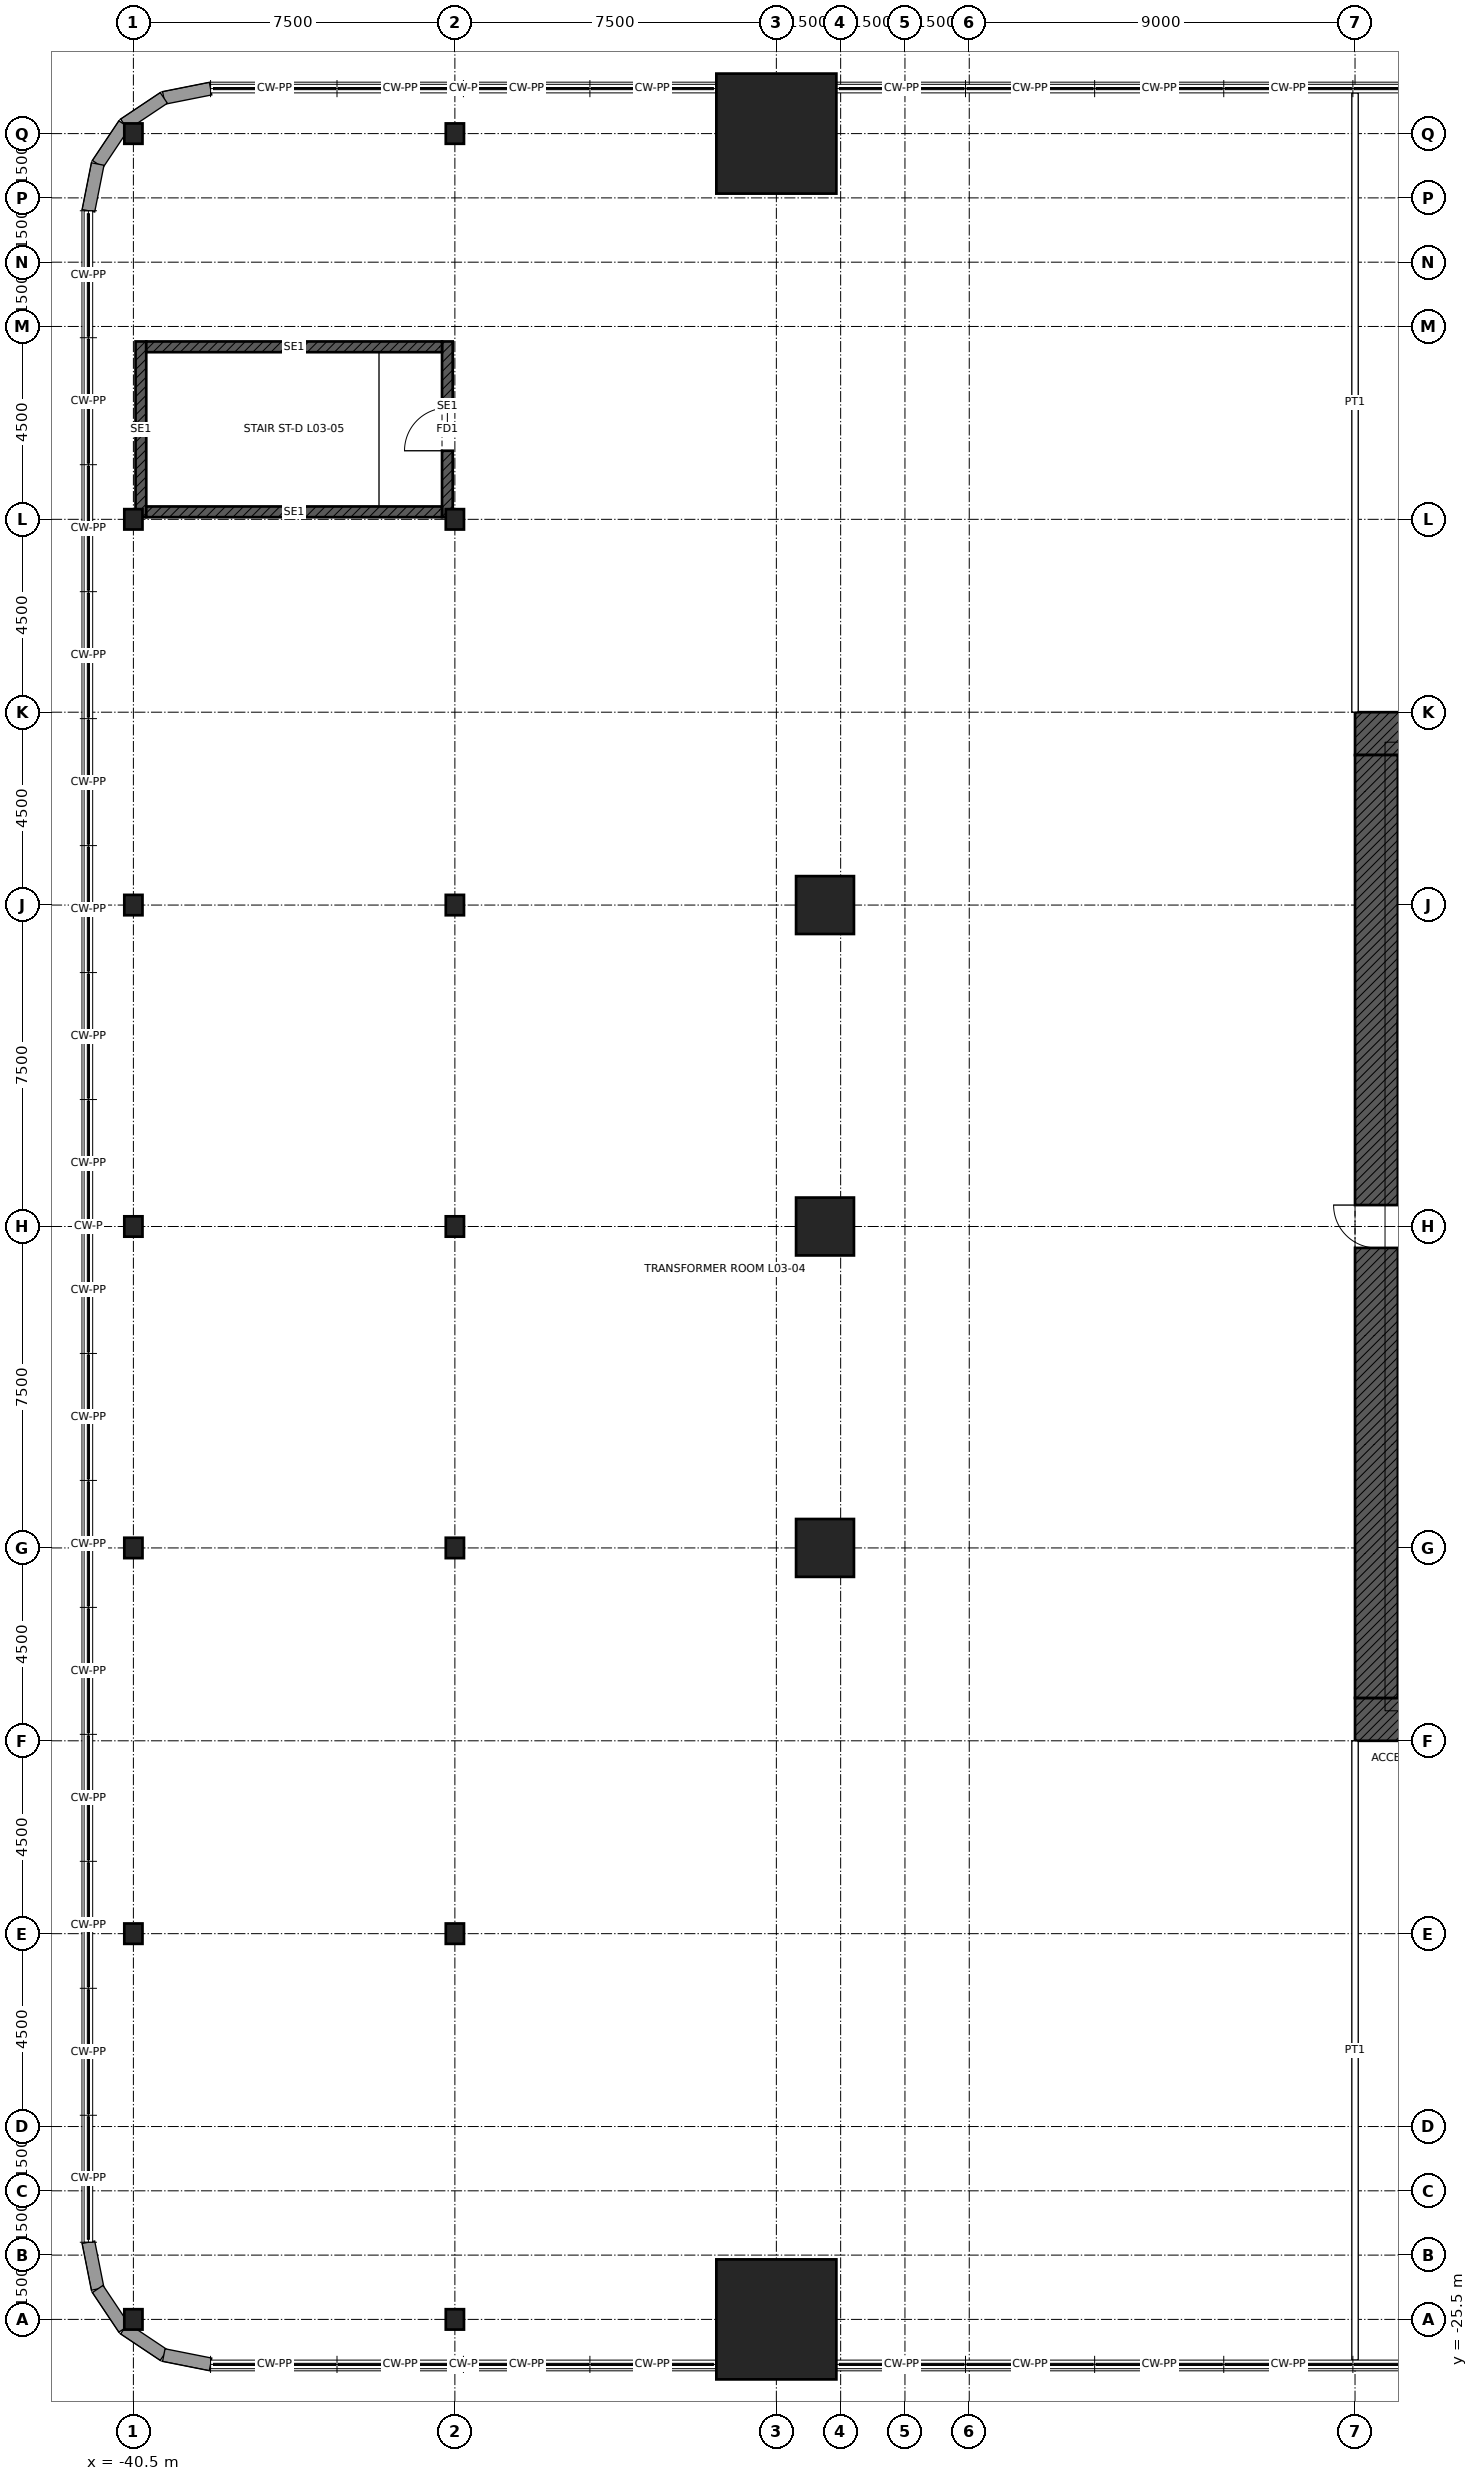
"""IFC4 building model, lengths in metres.
Left out: names, types, materials, properties, quantities, classifications, styles, units other than length and angle.
Written with IfcOpenShell. Run it as: python <this file> out.ifc"""

import sys

from ifc_helpers import new_model, si_unit, direction, frame, frame_2d, origin, origin_2d, place, context, subcontext, project, spatial, rectangle, hollow_rectangle, i_section, extrude, element, fill, save


model = new_model("IFC4")
c1 = context("Model", 3, precision=1e-05, world=origin(), true_north=direction((0.0, 1.0)))
c2 = subcontext(c1, "Body", "Model", "MODEL_VIEW")
j1 = project(units=[si_unit("LENGTHUNIT", "METRE"), si_unit("PLANEANGLEUNIT", "RADIAN")], contexts=[c1])
p1 = place(None, origin())
s1 = spatial("IfcSite", under=j1, at=p1, CompositionType="ELEMENT")
p2 = place(p1, origin())
s2 = spatial("IfcBuilding", under=s1, at=p2, CompositionType="ELEMENT")
p3 = place(p2, frame((0.0, 0.0, 18.0)))
s3 = spatial("IfcBuildingStorey", under=s2, at=p3, CompositionType="ELEMENT", Elevation=18.0)
for number, where, z_axis, x_axis in (
    (1, (-25.5, -25.5, 0.0), (0.0, 0.0, 1.0), (1.0, 0.0, 0.0)),
    (2, (-25.5, 25.5, 0.0), (0.0, 0.0, 1.0), (1.0, 0.0, 0.0)),
):
    element("IfcColumn", number, at=place(p3, frame(where, z_axis=z_axis, x_axis=x_axis)), inside=s3, PredefinedType="COLUMN", context=c2, shape_type="SweptSolid", body=[
        extrude(hollow_rectangle(XDim=2.8, YDim=2.8, WallThickness=0.14, at=origin_2d()), origin(), (0.0, 0.0, 1.0), 5.4),
    ])
for number, where, z_axis, x_axis in (
    (3, (-24.365, -7.5, 0.0), (0.0, 0.0, 1.0), (1.0, 0.0, 0.0)),
    (4, (-24.365, 0.0, 0.0), (0.0, 0.0, 1.0), (1.0, 0.0, 0.0)),
    (5, (-24.365, 7.5, 0.0), (0.0, 0.0, 1.0), (1.0, 0.0, 0.0)),
):
    element("IfcColumn", number, at=place(p3, frame(where, z_axis=z_axis, x_axis=x_axis)), inside=s3, PredefinedType="COLUMN", context=c2, shape_type="SweptSolid", body=[
        extrude(hollow_rectangle(XDim=1.35, YDim=1.35, WallThickness=0.1, at=origin_2d()), origin(), (0.0, 0.0, 1.0), 5.4),
    ])
for number, where, z_axis, x_axis in (
    (6, (-33.0, -25.5, 0.0), (0.0, 0.0, 1.0), (1.0, 0.0, 0.0)),
    (7, (-33.0, -16.5, 0.0), (0.0, 0.0, 1.0), (1.0, 0.0, 0.0)),
    (8, (-33.0, -7.5, 0.0), (0.0, 0.0, 1.0), (1.0, 0.0, 0.0)),
    (9, (-33.0, 0.0, 0.0), (0.0, 0.0, 1.0), (1.0, 0.0, 0.0)),
    (10, (-33.0, 7.5, 0.0), (0.0, 0.0, 1.0), (1.0, 0.0, 0.0)),
    (11, (-33.0, 16.5, 0.0), (0.0, 0.0, 1.0), (1.0, 0.0, 0.0)),
    (12, (-33.0, 25.5, 0.0), (0.0, 0.0, 1.0), (1.0, 0.0, 0.0)),
    (13, (-40.5, -25.5, 0.0), (0.0, 0.0, 1.0), (1.0, 0.0, 0.0)),
    (14, (-40.5, -16.5, 0.0), (0.0, 0.0, 1.0), (1.0, 0.0, 0.0)),
    (15, (-40.5, -7.5, 0.0), (0.0, 0.0, 1.0), (1.0, 0.0, 0.0)),
    (16, (-40.5, 0.0, 0.0), (0.0, 0.0, 1.0), (1.0, 0.0, 0.0)),
    (17, (-40.5, 7.5, 0.0), (0.0, 0.0, 1.0), (1.0, 0.0, 0.0)),
    (18, (-40.5, 16.5, 0.0), (0.0, 0.0, 1.0), (1.0, 0.0, 0.0)),
    (19, (-40.5, 25.5, 0.0), (0.0, 0.0, 1.0), (1.0, 0.0, 0.0)),
):
    element("IfcColumn", number, at=place(p3, frame(where, z_axis=z_axis, x_axis=x_axis)), inside=s3, PredefinedType="COLUMN", context=c2, shape_type="SweptSolid", body=[
        extrude(i_section(OverallWidth=0.424, OverallDepth=0.475, WebThickness=0.048, FlangeThickness=0.077, at=origin_2d()), origin(), (0.0, 0.0, 1.0), 5.4),
    ])
p4 = place(p3, frame((-12.0, 11.5, 0.0), z_axis=(0.0, 0.0, 1.0), x_axis=(1.0, 0.0, 0.0)))
e20 = element("IfcWall", 20, at=p4, inside=s3, PredefinedType="SHEAR", context=c2, shape_type="SweptSolid", body=[
    extrude(rectangle(XDim=24.0, YDim=1.0, at=frame_2d((12.0, 0.0))), origin(), (0.0, 0.0, 1.0), 5.4),
])
p5 = place(p4, frame((6.25, 0.0, 0.0)))
e21 = element("IfcOpeningElement", 21, at=p5, cuts=e20, PredefinedType="OPENING", context=c2, shape_type="SweptSolid", body=[
    extrude(rectangle(XDim=1.0, YDim=2.4, at=frame_2d((0.5, 1.2))), frame((0.0, 0.51, 0.0), z_axis=(0.0, -1.0, 0.0), x_axis=(1.0, 0.0, 0.0)), (0.0, 0.0, 1.0), 1.02),
])
p6 = place(p4, frame((16.75, 0.0, 0.0)))
e22 = element("IfcOpeningElement", 22, at=p6, cuts=e20, PredefinedType="OPENING", context=c2, shape_type="SweptSolid", body=[
    extrude(rectangle(XDim=1.0, YDim=2.4, at=frame_2d((0.5, 1.2))), frame((0.0, 0.51, 0.0), z_axis=(0.0, -1.0, 0.0), x_axis=(1.0, 0.0, 0.0)), (0.0, 0.0, 1.0), 1.02),
])
p7 = place(p3, frame((12.0, -11.5, 0.0), z_axis=(0.0, 0.0, 1.0), x_axis=(-1.0, 0.0, 0.0)))
e23 = element("IfcWall", 23, at=p7, inside=s3, PredefinedType="SHEAR", context=c2, shape_type="SweptSolid", body=[
    extrude(rectangle(XDim=24.0, YDim=1.0, at=frame_2d((12.0, 0.0))), origin(), (0.0, 0.0, 1.0), 5.4),
])
p8 = place(p7, frame((11.5, 0.0, 0.0)))
e24 = element("IfcOpeningElement", 24, at=p8, cuts=e23, PredefinedType="OPENING", context=c2, shape_type="SweptSolid", body=[
    extrude(rectangle(XDim=1.0, YDim=2.1, at=frame_2d((0.5, 1.05))), frame((0.0, 0.51, 0.0), z_axis=(0.0, -1.0, 0.0), x_axis=(1.0, 0.0, 0.0)), (0.0, 0.0, 1.0), 1.02),
])
p9 = place(p7, frame((1.0, 0.0, 0.0)))
e25 = element("IfcOpeningElement", 25, at=p9, cuts=e23, PredefinedType="OPENING", context=c2, shape_type="SweptSolid", body=[
    extrude(rectangle(XDim=1.0, YDim=2.4, at=frame_2d((0.5, 1.2))), frame((0.0, 0.51, 0.0), z_axis=(0.0, -1.0, 0.0), x_axis=(1.0, 0.0, 0.0)), (0.0, 0.0, 1.0), 1.02),
])
p10 = place(p3, frame((-11.5, -11.0, 0.0), z_axis=(0.0, 0.0, 1.0), x_axis=(0.0, 1.0, 0.0)))
e26 = element("IfcWall", 26, at=p10, inside=s3, PredefinedType="SHEAR", context=c2, shape_type="SweptSolid", body=[
    extrude(rectangle(XDim=22.0, YDim=1.0, at=frame_2d((11.0, 0.0))), origin(), (0.0, 0.0, 1.0), 5.4),
])
p11 = place(p10, frame((10.5, 0.0, 0.0)))
e27 = element("IfcOpeningElement", 27, at=p11, cuts=e26, PredefinedType="OPENING", context=c2, shape_type="SweptSolid", body=[
    extrude(rectangle(XDim=1.0, YDim=2.4, at=frame_2d((0.5, 1.2))), frame((0.0, 0.51, 0.0), z_axis=(0.0, -1.0, 0.0), x_axis=(1.0, 0.0, 0.0)), (0.0, 0.0, 1.0), 1.02),
])
for number, where, z_axis, x_axis in (
    (28, (-38.7, 26.55, 0.0), (0.0, 0.0, 1.0), (-0.981, -0.195, 0.0)),
    (29, (-39.791, 26.333, 0.0), (0.0, 0.0, 1.0), (-0.832, -0.555, 0.0)),
    (30, (-40.715, 25.715, 0.0), (0.0, 0.0, 1.0), (-0.555, -0.832, 0.0)),
    (31, (-41.333, 24.791, 0.0), (0.0, 0.0, 1.0), (-0.195, -0.981, 0.0)),
    (32, (-41.55, -23.7, 0.0), (0.0, 0.0, 1.0), (0.195, -0.981, 0.0)),
    (33, (-41.333, -24.791, 0.0), (0.0, 0.0, 1.0), (0.555, -0.832, 0.0)),
    (34, (-40.715, -25.715, 0.0), (0.0, 0.0, 1.0), (0.832, -0.555, 0.0)),
    (35, (-39.791, -26.333, 0.0), (0.0, 0.0, 1.0), (0.981, -0.195, 0.0)),
):
    element("IfcWall", number, at=place(p3, frame(where, z_axis=z_axis, x_axis=x_axis)), inside=s3, PredefinedType="SOLIDWALL", context=c2, shape_type="SweptSolid", body=[
        extrude(rectangle(XDim=1.112, YDim=0.3, at=frame_2d((0.556, 0.0))), origin(), (0.0, 0.0, 1.0), 5.2),
    ])
p12 = place(p3, frame((-12.0, 12.0, 0.0), z_axis=(0.0, 0.0, 1.0), x_axis=(0.0, 1.0, 0.0)))
e36 = element("IfcWall", 36, at=p12, inside=s3, PredefinedType="PARTITIONING", context=c2, shape_type="SweptSolid", body=[
    extrude(rectangle(XDim=14.45, YDim=0.15, at=frame_2d((7.225, 0.0))), origin(), (0.0, 0.0, 1.0), 4.164),
])
p13 = place(p3, frame((-12.0, -12.0, 0.0), z_axis=(0.0, 0.0, 1.0), x_axis=(0.0, -1.0, 0.0)))
e37 = element("IfcWall", 37, at=p13, inside=s3, PredefinedType="PARTITIONING", context=c2, shape_type="SweptSolid", body=[
    extrude(rectangle(XDim=14.45, YDim=0.15, at=frame_2d((7.225, 0.0))), origin(), (0.0, 0.0, 1.0), 5.2),
])
p14 = place(p3, frame((-40.325, 16.55, 0.0), z_axis=(0.0, 0.0, 1.0), x_axis=(0.0, 1.0, 0.0)))
e38 = element("IfcWall", 38, at=p14, inside=s3, PredefinedType="SOLIDWALL", context=c2, shape_type="SweptSolid", body=[
    extrude(rectangle(XDim=4.1, YDim=0.25, at=frame_2d((2.05, 0.0))), origin(), (0.0, 0.0, 1.0), 5.2),
])
p15 = place(p3, frame((-33.175, 16.55, 0.0), z_axis=(0.0, 0.0, 1.0), x_axis=(0.0, 1.0, 0.0)))
e39 = element("IfcWall", 39, at=p15, inside=s3, PredefinedType="SOLIDWALL", context=c2, shape_type="SweptSolid", body=[
    extrude(rectangle(XDim=4.1, YDim=0.25, at=frame_2d((2.05, 0.0))), origin(), (0.0, 0.0, 1.0), 5.2),
])
p16 = place(p15, frame((1.55, 0.0, 0.0)))
e40 = element("IfcOpeningElement", 40, at=p16, cuts=e39, PredefinedType="OPENING", context=c2, shape_type="SweptSolid", body=[
    extrude(rectangle(XDim=1.0, YDim=2.1, at=frame_2d((0.5, 1.05))), frame((0.0, 0.135, 0.0), z_axis=(0.0, -1.0, 0.0), x_axis=(1.0, 0.0, 0.0)), (0.0, 0.0, 1.0), 0.27),
])
for number, where, z_axis, x_axis in (
    (41, (-40.2, 16.675, 0.0), (0.0, 0.0, 1.0), (1.0, 0.0, 0.0)),
    (42, (-40.2, 20.525, 0.0), (0.0, 0.0, 1.0), (1.0, 0.0, 0.0)),
):
    element("IfcWall", number, at=place(p3, frame(where, z_axis=z_axis, x_axis=x_axis)), inside=s3, PredefinedType="SOLIDWALL", context=c2, shape_type="SweptSolid", body=[
        extrude(rectangle(XDim=6.9, YDim=0.25, at=frame_2d((3.45, 0.0))), origin(), (0.0, 0.0, 1.0), 5.2),
    ])
p17 = place(p11, origin())
e43 = element("IfcDoor", 43, at=p17, inside=s3, OperationType="SINGLE_SWING_RIGHT", PredefinedType="DOOR", context=c2, shape_type="SweptSolid", body=[
    extrude(rectangle(XDim=1.0, YDim=2.4, at=frame_2d((0.5, 1.2))), frame((0.0, 0.485, 0.0), z_axis=(0.0, -1.0, 0.0), x_axis=(1.0, 0.0, 0.0)), (0.0, 0.0, 1.0), 0.05),
])
fill(e27, e43)
p18 = place(p16, origin())
e44 = element("IfcDoor", 44, at=p18, inside=s3, OperationType="SINGLE_SWING_LEFT", PredefinedType="DOOR", context=c2, shape_type="SweptSolid", body=[
    extrude(rectangle(XDim=1.0, YDim=2.1, at=frame_2d((0.5, 1.05))), frame((0.0, 0.025, 0.0), z_axis=(0.0, -1.0, 0.0), x_axis=(1.0, 0.0, 0.0)), (0.0, 0.0, 1.0), 0.05),
])
fill(e40, e44)
save(model, sys.argv[1])
